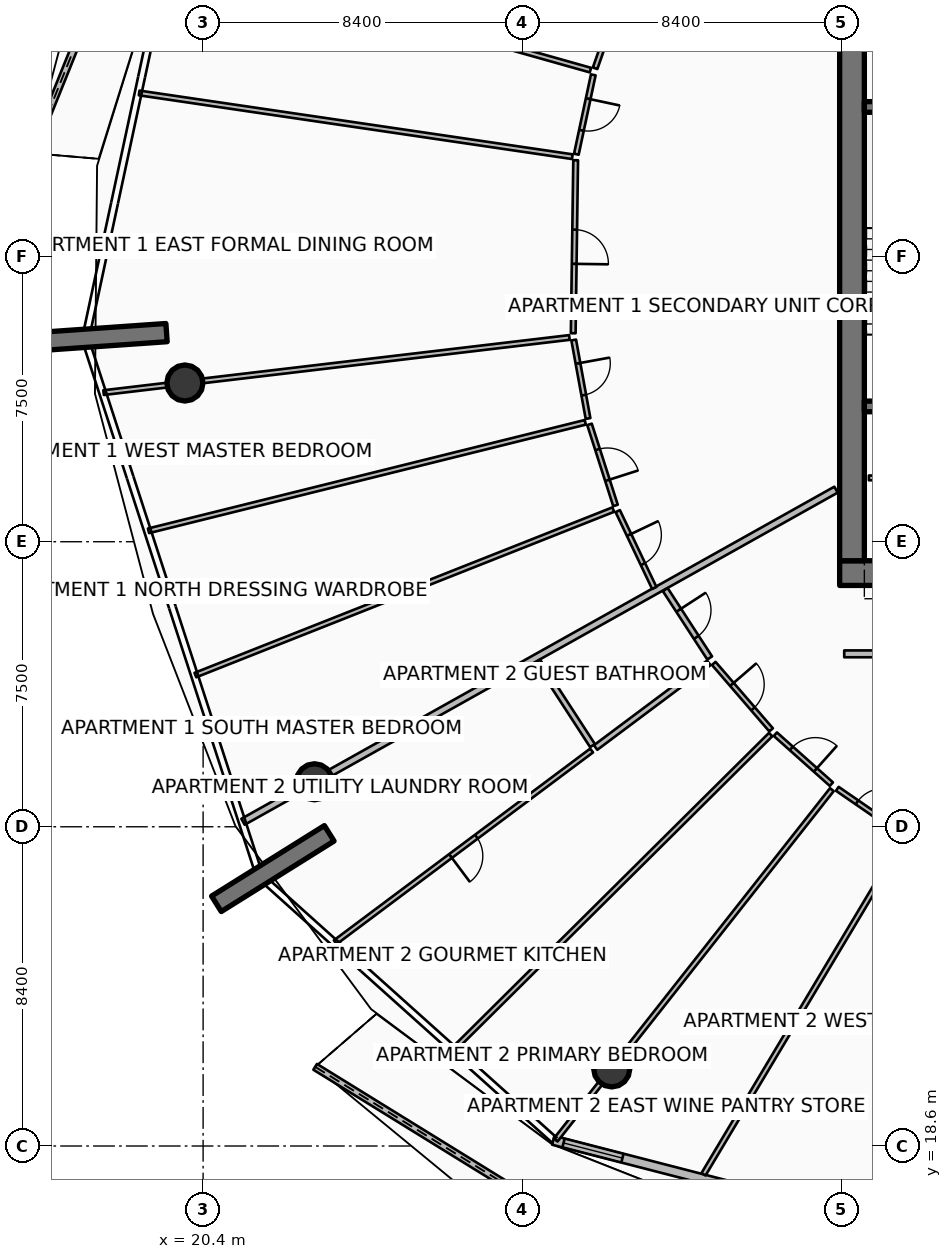
"""IFC4 building model, lengths in metres.
Left out: names, types, materials, properties, quantities, classifications, styles, units other than length and angle.
Written with IfcOpenShell. Run it as: python <this file> out.ifc"""

import sys

from ifc_helpers import new_model, si_unit, direction, frame, frame_2d, origin, origin_2d, place, context, subcontext, project, spatial, polyline, rectangle, circle, outline, extrude, element, fill, save


model = new_model("IFC4")
c1 = context("Model", 3, precision=1e-05, world=origin(), true_north=direction((0.0, 1.0)))
c2 = subcontext(c1, "Body", "Model", "MODEL_VIEW")
j1 = project(units=[si_unit("LENGTHUNIT", "METRE"), si_unit("PLANEANGLEUNIT", "RADIAN")], contexts=[c1])
p1 = place(None, origin())
s1 = spatial("IfcSite", under=j1, at=p1, CompositionType="ELEMENT")
p2 = place(p1, origin())
s2 = spatial("IfcBuilding", under=s1, at=p2, CompositionType="ELEMENT")
p3 = place(p2, frame((0.0, 0.0, 240.55)))
s3 = spatial("IfcBuildingStorey", under=s2, at=p3, CompositionType="ELEMENT", Elevation=240.55)
p4 = place(p3, frame((37.15, 33.675, 0.0), z_axis=(0.0, 0.0, 1.0), x_axis=(1.0, 0.0, 0.0)))
e1 = element("IfcWall", 1, at=p4, inside=s3, PredefinedType="SHEAR", context=c2, shape_type="SweptSolid", body=[
    extrude(rectangle(XDim=9.75, YDim=0.65, at=frame_2d((4.875, 0.0))), origin(), (0.0, 0.0, 1.0), 3.85),
])
p5 = place(p3, frame((37.475, 34.0, 0.0), z_axis=(0.0, 0.0, 1.0), x_axis=(0.0, 1.0, 0.0)))
e2 = element("IfcWall", 2, at=p5, inside=s3, PredefinedType="SHEAR", context=c2, shape_type="SweptSolid", body=[
    extrude(rectangle(XDim=16.0, YDim=0.65, at=frame_2d((8.0, 0.0))), origin(), (0.0, 0.0, 1.0), 3.85),
])
for number, where, z_axis, x_axis in (
    (3, (37.8, 38.06, 0.0), (0.0, 0.0, 1.0), (1.0, 0.0, 0.0)),
    (4, (37.8, 45.94, 0.0), (0.0, 0.0, 1.0), (1.0, 0.0, 0.0)),
):
    element("IfcWall", number, at=place(p3, frame(where, z_axis=z_axis, x_axis=x_axis)), inside=s3, PredefinedType="SHEAR", context=c2, shape_type="SweptSolid", body=[
        extrude(rectangle(XDim=3.5, YDim=0.28, at=frame_2d((1.75, 0.0))), origin(), (0.0, 0.0, 1.0), 3.85),
    ])
p6 = place(p3, frame((19.438, 40.003, 0.0), z_axis=(0.0, 0.0, 1.0), x_axis=(-0.997563824095, -0.069759707979, 0.0)))
e5 = element("IfcWall", 5, at=p6, inside=s3, PredefinedType="SOLIDWALL", context=c2, shape_type="SweptSolid", body=[
    extrude(rectangle(XDim=3.5, YDim=0.48, at=frame_2d((1.75, 0.0))), origin(), (0.0, 0.0, 1.0), 3.85),
])
p7 = place(p3, frame((23.719, 26.827, 0.0), z_axis=(0.0, 0.0, 1.0), x_axis=(-0.848033572426, -0.529942506352, 0.0)))
e6 = element("IfcWall", 6, at=p7, inside=s3, PredefinedType="SOLIDWALL", context=c2, shape_type="SweptSolid", body=[
    extrude(rectangle(XDim=3.5, YDim=0.48, at=frame_2d((1.75, 0.0))), origin(), (0.0, 0.0, 1.0), 3.85),
])
for number, where, z_axis, x_axis in (
    (7, (19.92, 38.677, 0.0), (0.0, 0.0, 1.0), (1.0, 0.0, 0.0)),
    (8, (23.33, 28.184, 0.0), (0.0, 0.0, 1.0), (1.0, 0.0, 0.0)),
    (9, (31.153, 20.629, 0.0), (0.0, 0.0, 1.0), (1.0, 0.0, 0.0)),
):
    element("IfcColumn", number, at=place(p3, frame(where, z_axis=z_axis, x_axis=x_axis)), inside=s3, PredefinedType="COLUMN", context=c2, shape_type="SweptSolid", body=[
        extrude(circle(Radius=0.475, at=origin_2d()), origin(), (0.0, 0.0, 1.0), 3.59),
    ])
p8 = place(p3, frame((20.413, 55.922, 0.0), z_axis=(0.0, 0.0, 1.0), x_axis=(-0.374094279698, -0.927390678138, 0.0)))
e10 = element("IfcWall", 10, at=p8, inside=s3, PredefinedType="PARAPET", context=c2, shape_type="SweptSolid", body=[
    extrude(outline(polyline([(0.0, 0.0), (12.075, 0.0), (12.075, 1.233), (6.037, 1.418), (0.0, 1.632), (0.0, 0.0)])), frame((0.0, 0.09, 0.0), z_axis=(0.0, -1.0, 0.0), x_axis=(1.0, 0.0, 0.0)), (0.0, 0.0, 1.0), 0.18),
])
p9 = place(p3, frame((23.348, 20.684, 0.0), z_axis=(0.0, 0.0, 1.0), x_axis=(0.850900796978, -0.52532640682, 0.0)))
e11 = element("IfcWall", 11, at=p9, inside=s3, PredefinedType="PARAPET", context=c2, shape_type="SweptSolid", body=[
    extrude(outline(polyline([(0.0, 0.0), (12.209, 0.0), (12.208, 1.832), (6.104, 1.696), (0.0, 1.497), (0.0, 0.0)])), frame((0.0, 0.09, 0.0), z_axis=(0.0, -1.0, 0.0), x_axis=(1.0, 0.0, 0.0)), (0.0, 0.0, 1.0), 0.18),
])
p10 = place(p3, frame((29.614, 18.751, 0.0), z_axis=(0.0, 0.0, 1.0), x_axis=(0.968343758421, -0.249620442927, 0.0)))
e12 = element("IfcWall", 12, at=p10, inside=s3, PredefinedType="SOLIDWALL", context=c2, shape_type="SweptSolid", body=[
    extrude(rectangle(XDim=11.438, YDim=0.24, at=frame_2d((5.719, 0.0))), origin(), (0.0, 0.0, 1.0), 2.54),
])
p11 = place(p10, frame((9.218, 0.0, 0.0)))
e13 = element("IfcOpeningElement", 13, at=p11, cuts=e12, PredefinedType="OPENING", context=c2, shape_type="SweptSolid", body=[
    extrude(rectangle(XDim=1.45, YDim=2.15, at=frame_2d((0.725, 1.075))), frame((0.0, 0.13, 0.0), z_axis=(0.0, -1.0, 0.0), x_axis=(1.0, 0.0, 0.0)), (0.0, 0.0, 1.0), 0.26),
])
p12 = place(p10, frame((0.28, 0.0, 0.65)))
e14 = element("IfcOpeningElement", 14, at=p12, cuts=e12, PredefinedType="OPENING", context=c2, shape_type="SweptSolid", body=[
    extrude(rectangle(XDim=1.6, YDim=1.5, at=frame_2d((0.8, 0.75))), frame((0.0, 0.13, 0.0), z_axis=(0.0, -1.0, 0.0), x_axis=(1.0, 0.0, 0.0)), (0.0, 0.0, 1.0), 0.26),
])
p13 = place(p3, frame((37.92, 36.18, 0.0), z_axis=(0.0, 0.0, 1.0), x_axis=(1.0, 0.0, 0.0)))
e15 = element("IfcWall", 15, at=p13, inside=s3, PredefinedType="PARTITIONING", context=c2, shape_type="SweptSolid", body=[
    extrude(rectangle(XDim=8.8, YDim=0.125, at=frame_2d((4.4, 0.0))), origin(), (0.0, 0.0, 1.0), 3.03),
])
p14 = place(p13, frame((3.975, 0.0, 0.0)))
e16 = element("IfcOpeningElement", 16, at=p14, cuts=e15, PredefinedType="OPENING", context=c2, shape_type="SweptSolid", body=[
    extrude(rectangle(XDim=0.85, YDim=2.06, at=frame_2d((0.425, 1.03))), frame((0.0, 0.073, 0.0), z_axis=(0.0, -1.0, 0.0), x_axis=(1.0, 0.0, 0.0)), (0.0, 0.0, 1.0), 0.145),
])
p15 = place(p3, frame((37.054, 35.87, 0.0), z_axis=(0.0, 0.0, 1.0), x_axis=(-0.872490186067, -0.488631635506, 0.0)))
e17 = element("IfcWall", 17, at=p15, inside=s3, PredefinedType="PARTITIONING", context=c2, shape_type="SweptSolid", body=[
    extrude(rectangle(XDim=17.884, YDim=0.18, at=frame_2d((8.942, 0.0))), origin(), (0.0, 0.0, 1.0), 2.957),
])
p16 = place(p3, frame((31.41, 48.938, 0.0), z_axis=(0.0, 0.0, 1.0), x_axis=(-0.331438416753, -0.943476854989, 0.0)))
e18 = element("IfcWall", 18, at=p16, inside=s3, PredefinedType="PARTITIONING", context=c2, shape_type="SweptSolid", body=[
    extrude(rectangle(XDim=2.099, YDim=0.125, at=frame_2d((1.049, 0.0))), origin(), (0.0, 0.0, 1.0), 2.957),
])
p17 = place(p16, frame((0.625, 0.0, 0.0)))
e19 = element("IfcOpeningElement", 19, at=p17, cuts=e18, PredefinedType="OPENING", context=c2, shape_type="SweptSolid", body=[
    extrude(rectangle(XDim=0.85, YDim=2.06, at=frame_2d((0.425, 1.03))), frame((0.0, 0.073, 0.0), z_axis=(0.0, -1.0, 0.0), x_axis=(1.0, 0.0, 0.0)), (0.0, 0.0, 1.0), 0.145),
])
p18 = place(p3, frame((30.592, 46.909, 0.0), z_axis=(0.0, 0.0, 1.0), x_axis=(-0.96245110957, 0.271455082266, 0.0)))
e20 = element("IfcWall", 20, at=p18, inside=s3, PredefinedType="PARTITIONING", context=c2, shape_type="SweptSolid", body=[
    extrude(rectangle(XDim=11.409, YDim=0.125, at=frame_2d((5.704, 0.0))), origin(), (0.0, 0.0, 1.0), 2.957),
])
p19 = place(p3, frame((30.115, 44.631, 0.0), z_axis=(0.0, 0.0, 1.0), x_axis=(-0.989347020715, 0.145576346298, 0.0)))
e21 = element("IfcWall", 21, at=p19, inside=s3, PredefinedType="PARTITIONING", context=c2, shape_type="SweptSolid", body=[
    extrude(rectangle(XDim=11.521, YDim=0.125, at=frame_2d((5.761, 0.0))), origin(), (0.0, 0.0, 1.0), 3.03),
])
p20 = place(p3, frame((30.667, 46.785, 0.0), z_axis=(0.0, 0.0, 1.0), x_axis=(-0.209005902588, -0.977914379014, 0.0)))
e22 = element("IfcWall", 22, at=p20, inside=s3, PredefinedType="PARTITIONING", context=c2, shape_type="SweptSolid", body=[
    extrude(rectangle(XDim=2.135, YDim=0.125, at=frame_2d((1.068, 0.0))), origin(), (0.0, 0.0, 1.0), 2.957),
])
p21 = place(p20, frame((0.643, 0.0, 0.0)))
e23 = element("IfcOpeningElement", 23, at=p21, cuts=e22, PredefinedType="OPENING", context=c2, shape_type="SweptSolid", body=[
    extrude(rectangle(XDim=0.85, YDim=2.06, at=frame_2d((0.425, 1.03))), frame((0.0, 0.073, 0.0), z_axis=(0.0, -1.0, 0.0), x_axis=(1.0, 0.0, 0.0)), (0.0, 0.0, 1.0), 0.145),
])
p22 = place(p3, frame((30.204, 44.538, 0.0), z_axis=(0.0, 0.0, 1.0), x_axis=(-0.014156354672, -0.999899793791, 0.0)))
e24 = element("IfcWall", 24, at=p22, inside=s3, PredefinedType="PARTITIONING", context=c2, shape_type="SweptSolid", body=[
    extrude(rectangle(XDim=4.553, YDim=0.125, at=frame_2d((2.276, 0.0))), origin(), (0.0, 0.0, 1.0), 2.957),
])
p23 = place(p22, frame((1.826, 0.0, 0.0)))
e25 = element("IfcOpeningElement", 25, at=p23, cuts=e24, PredefinedType="OPENING", context=c2, shape_type="SweptSolid", body=[
    extrude(rectangle(XDim=0.9, YDim=2.08, at=frame_2d((0.45, 1.04))), frame((0.0, 0.073, 0.0), z_axis=(0.0, -1.0, 0.0), x_axis=(1.0, 0.0, 0.0)), (0.0, 0.0, 1.0), 0.145),
])
p24 = place(p3, frame((30.038, 39.874, 0.0), z_axis=(0.0, 0.0, 1.0), x_axis=(-0.993068810962, -0.117534406428, 0.0)))
e26 = element("IfcWall", 26, at=p24, inside=s3, PredefinedType="PARTITIONING", context=c2, shape_type="SweptSolid", body=[
    extrude(rectangle(XDim=12.343, YDim=0.125, at=frame_2d((6.171, 0.0))), origin(), (0.0, 0.0, 1.0), 2.957),
])
p25 = place(p3, frame((30.456, 37.642, 0.0), z_axis=(0.0, 0.0, 1.0), x_axis=(-0.970505215381, -0.241080125513, 0.0)))
e27 = element("IfcWall", 27, at=p25, inside=s3, PredefinedType="PARTITIONING", context=c2, shape_type="SweptSolid", body=[
    extrude(rectangle(XDim=11.843, YDim=0.125, at=frame_2d((5.921, 0.0))), origin(), (0.0, 0.0, 1.0), 3.03),
])
p26 = place(p3, frame((31.192, 35.345, 0.0), z_axis=(0.0, 0.0, 1.0), x_axis=(-0.929773642051, -0.368131735317, 0.0)))
e28 = element("IfcWall", 28, at=p26, inside=s3, PredefinedType="PARTITIONING", context=c2, shape_type="SweptSolid", body=[
    extrude(rectangle(XDim=11.827, YDim=0.125, at=frame_2d((5.913, 0.0))), origin(), (0.0, 0.0, 1.0), 3.03),
])
p27 = place(p3, frame((30.152, 39.807, 0.0), z_axis=(0.0, 0.0, 1.0), x_axis=(0.179601937348, -0.983739367973, 0.0)))
e29 = element("IfcWall", 29, at=p27, inside=s3, PredefinedType="PARTITIONING", context=c2, shape_type="SweptSolid", body=[
    extrude(rectangle(XDim=2.099, YDim=0.125, at=frame_2d((1.049, 0.0))), origin(), (0.0, 0.0, 1.0), 2.957),
])
p28 = place(p27, frame((0.625, 0.0, 0.0)))
e30 = element("IfcOpeningElement", 30, at=p28, cuts=e29, PredefinedType="OPENING", context=c2, shape_type="SweptSolid", body=[
    extrude(rectangle(XDim=0.85, YDim=2.06, at=frame_2d((0.425, 1.03))), frame((0.0, 0.073, 0.0), z_axis=(0.0, -1.0, 0.0), x_axis=(1.0, 0.0, 0.0)), (0.0, 0.0, 1.0), 0.145),
])
p29 = place(p3, frame((30.568, 37.588, 0.0), z_axis=(0.0, 0.0, 1.0), x_axis=(0.305285840617, -0.952260760254, 0.0)))
e31 = element("IfcWall", 31, at=p29, inside=s3, PredefinedType="PARTITIONING", context=c2, shape_type="SweptSolid", body=[
    extrude(rectangle(XDim=2.24, YDim=0.125, at=frame_2d((1.12, 0.0))), origin(), (0.0, 0.0, 1.0), 3.03),
])
p30 = place(p29, frame((0.695, 0.0, 0.0)))
e32 = element("IfcOpeningElement", 32, at=p30, cuts=e31, PredefinedType="OPENING", context=c2, shape_type="SweptSolid", body=[
    extrude(rectangle(XDim=0.85, YDim=2.06, at=frame_2d((0.425, 1.03))), frame((0.0, 0.073, 0.0), z_axis=(0.0, -1.0, 0.0), x_axis=(1.0, 0.0, 0.0)), (0.0, 0.0, 1.0), 0.145),
])
p31 = place(p3, frame((31.31, 35.306, 0.0), z_axis=(0.0, 0.0, 1.0), x_axis=(0.429468098594, -0.903082029657, 0.0)))
e33 = element("IfcWall", 33, at=p31, inside=s3, PredefinedType="PARTITIONING", context=c2, shape_type="SweptSolid", body=[
    extrude(rectangle(XDim=2.24, YDim=0.125, at=frame_2d((1.12, 0.0))), origin(), (0.0, 0.0, 1.0), 2.957),
])
p32 = place(p31, frame((0.695, 0.0, 0.0)))
e34 = element("IfcOpeningElement", 34, at=p32, cuts=e33, PredefinedType="OPENING", context=c2, shape_type="SweptSolid", body=[
    extrude(rectangle(XDim=0.85, YDim=2.06, at=frame_2d((0.425, 1.03))), frame((0.0, 0.073, 0.0), z_axis=(0.0, -1.0, 0.0), x_axis=(1.0, 0.0, 0.0)), (0.0, 0.0, 1.0), 0.145),
])
p33 = place(p3, frame((37.27, 31.55, 0.0), z_axis=(0.0, 0.0, 1.0), x_axis=(1.0, 0.0, 0.0)))
e35 = element("IfcWall", 35, at=p33, inside=s3, PredefinedType="PARTITIONING", context=c2, shape_type="SweptSolid", body=[
    extrude(rectangle(XDim=2.372, YDim=0.18, at=frame_2d((1.186, 0.0))), origin(), (0.0, 0.0, 1.0), 2.957),
])
p34 = place(p3, frame((32.562, 33.24, 0.0), z_axis=(0.0, 0.0, 1.0), x_axis=(0.544888302375, -0.838508639154, 0.0)))
e36 = element("IfcWall", 36, at=p34, inside=s3, PredefinedType="PARTITIONING", context=c2, shape_type="SweptSolid", body=[
    extrude(rectangle(XDim=2.144, YDim=0.15, at=frame_2d((1.072, 0.0))), origin(), (0.0, 0.0, 1.0), 2.957),
])
p35 = place(p34, frame((0.647, 0.0, 0.0)))
e37 = element("IfcOpeningElement", 37, at=p35, cuts=e36, PredefinedType="OPENING", context=c2, shape_type="SweptSolid", body=[
    extrude(rectangle(XDim=0.85, YDim=2.06, at=frame_2d((0.425, 1.03))), frame((0.0, 0.085, 0.0), z_axis=(0.0, -1.0, 0.0), x_axis=(1.0, 0.0, 0.0)), (0.0, 0.0, 1.0), 0.17),
])
p36 = place(p3, frame((29.202, 31.359, 0.0), z_axis=(0.0, 0.0, 1.0), x_axis=(0.544926834082, -0.838483598825, 0.0)))
e38 = element("IfcWall", 38, at=p36, inside=s3, PredefinedType="PARTITIONING", context=c2, shape_type="SweptSolid", body=[
    extrude(rectangle(XDim=2.651, YDim=0.15, at=frame_2d((1.325, 0.0))), origin(), (0.0, 0.0, 1.0), 2.957),
])
p37 = place(p3, frame((33.707, 31.312, 0.0), z_axis=(0.0, 0.0, 1.0), x_axis=(-0.800889069655, -0.598812740435, 0.0)))
e39 = element("IfcWall", 39, at=p37, inside=s3, PredefinedType="PARTITIONING", context=c2, shape_type="SweptSolid", body=[
    extrude(rectangle(XDim=3.72, YDim=0.15, at=frame_2d((1.86, 0.0))), origin(), (0.0, 0.0, 1.0), 3.03),
])
p38 = place(p3, frame((30.624, 29.007, 0.0), z_axis=(0.0, 0.0, 1.0), x_axis=(-0.800861586428, -0.598849496437, 0.0)))
e40 = element("IfcWall", 40, at=p38, inside=s3, PredefinedType="PARTITIONING", context=c2, shape_type="SweptSolid", body=[
    extrude(rectangle(XDim=8.425, YDim=0.125, at=frame_2d((4.212, 0.0))), origin(), (0.0, 0.0, 1.0), 3.03),
])
p39 = place(p38, frame((3.787, 0.0, 0.0)))
e41 = element("IfcOpeningElement", 41, at=p39, cuts=e40, PredefinedType="OPENING", context=c2, shape_type="SweptSolid", body=[
    extrude(rectangle(XDim=0.85, YDim=2.06, at=frame_2d((0.425, 1.03))), frame((0.0, 0.073, 0.0), z_axis=(0.0, -1.0, 0.0), x_axis=(1.0, 0.0, 0.0)), (0.0, 0.0, 1.0), 0.145),
])
p40 = place(p3, frame((35.335, 29.426, 0.0), z_axis=(0.0, 0.0, 1.0), x_axis=(-0.709660425086, -0.704543881576, 0.0)))
e42 = element("IfcWall", 42, at=p40, inside=s3, PredefinedType="PARTITIONING", context=c2, shape_type="SweptSolid", body=[
    extrude(rectangle(XDim=11.738, YDim=0.125, at=frame_2d((5.869, 0.0))), origin(), (0.0, 0.0, 1.0), 3.03),
])
p41 = place(p3, frame((33.838, 31.298, 0.0), z_axis=(0.0, 0.0, 1.0), x_axis=(0.653278423857, -0.757117758954, 0.0)))
e43 = element("IfcWall", 43, at=p41, inside=s3, PredefinedType="PARTITIONING", context=c2, shape_type="SweptSolid", body=[
    extrude(rectangle(XDim=2.309, YDim=0.125, at=frame_2d((1.154, 0.0))), origin(), (0.0, 0.0, 1.0), 3.03),
])
p42 = place(p41, frame((0.729, 0.0, 0.0)))
e44 = element("IfcOpeningElement", 44, at=p42, cuts=e43, PredefinedType="OPENING", context=c2, shape_type="SweptSolid", body=[
    extrude(rectangle(XDim=0.85, YDim=2.06, at=frame_2d((0.425, 1.03))), frame((0.0, 0.073, 0.0), z_axis=(0.0, -1.0, 0.0), x_axis=(1.0, 0.0, 0.0)), (0.0, 0.0, 1.0), 0.145),
])
p43 = place(p3, frame((35.458, 29.436, 0.0), z_axis=(0.0, 0.0, 1.0), x_axis=(0.746255603185, -0.665659503586, 0.0)))
e45 = element("IfcWall", 45, at=p43, inside=s3, PredefinedType="PARTITIONING", context=c2, shape_type="SweptSolid", body=[
    extrude(rectangle(XDim=1.975, YDim=0.125, at=frame_2d((0.988, 0.0))), origin(), (0.0, 0.0, 1.0), 2.957),
])
p44 = place(p43, frame((0.562, 0.0, 0.0)))
e46 = element("IfcOpeningElement", 46, at=p44, cuts=e45, PredefinedType="OPENING", context=c2, shape_type="SweptSolid", body=[
    extrude(rectangle(XDim=0.85, YDim=2.06, at=frame_2d((0.425, 1.03))), frame((0.0, 0.073, 0.0), z_axis=(0.0, -1.0, 0.0), x_axis=(1.0, 0.0, 0.0)), (0.0, 0.0, 1.0), 0.145),
])
p45 = place(p3, frame((36.945, 27.977, 0.0), z_axis=(0.0, 0.0, 1.0), x_axis=(-0.619096573209, -0.785314862358, 0.0)))
e47 = element("IfcWall", 47, at=p45, inside=s3, PredefinedType="PARTITIONING", context=c2, shape_type="SweptSolid", body=[
    extrude(rectangle(XDim=11.739, YDim=0.125, at=frame_2d((5.869, 0.0))), origin(), (0.0, 0.0, 1.0), 2.957),
])
p46 = place(p3, frame((38.843, 26.681, 0.0), z_axis=(0.0, 0.0, 1.0), x_axis=(-0.513080899873, -0.858340253154, 0.0)))
e48 = element("IfcWall", 48, at=p46, inside=s3, PredefinedType="PARTITIONING", context=c2, shape_type="SweptSolid", body=[
    extrude(rectangle(XDim=10.282, YDim=0.125, at=frame_2d((5.141, 0.0))), origin(), (0.0, 0.0, 1.0), 3.03),
])
p47 = place(p3, frame((37.089, 27.998, 0.0), z_axis=(0.0, 0.0, 1.0), x_axis=(0.823534084839, -0.567266790063, 0.0)))
e49 = element("IfcWall", 49, at=p47, inside=s3, PredefinedType="PARTITIONING", context=c2, shape_type="SweptSolid", body=[
    extrude(rectangle(XDim=2.105, YDim=0.125, at=frame_2d((1.053, 0.0))), origin(), (0.0, 0.0, 1.0), 2.957),
])
p48 = place(p47, frame((0.628, 0.0, 0.0)))
e50 = element("IfcOpeningElement", 50, at=p48, cuts=e49, PredefinedType="OPENING", context=c2, shape_type="SweptSolid", body=[
    extrude(rectangle(XDim=0.85, YDim=2.06, at=frame_2d((0.425, 1.03))), frame((0.0, 0.073, 0.0), z_axis=(0.0, -1.0, 0.0), x_axis=(1.0, 0.0, 0.0)), (0.0, 0.0, 1.0), 0.145),
])
p49 = place(p12, origin())
e51 = element("IfcWindow", 51, at=p49, inside=s3, PartitioningType="SINGLE_PANEL", PredefinedType="WINDOW", context=c2, shape_type="SweptSolid", body=[
    extrude(rectangle(XDim=1.6, YDim=1.5, at=frame_2d((0.8, 0.75))), frame((0.0, 0.03, 0.0), z_axis=(0.0, -1.0, 0.0), x_axis=(1.0, 0.0, 0.0)), (0.0, 0.0, 1.0), 0.06),
])
fill(e14, e51)
p50 = place(p21, origin())
e52 = element("IfcDoor", 52, at=p50, inside=s3, OperationType="SINGLE_SWING_LEFT", PredefinedType="DOOR", context=c2, shape_type="SweptSolid", body=[
    extrude(rectangle(XDim=0.85, YDim=2.06, at=frame_2d((0.425, 1.03))), frame((0.0, 0.025, 0.0), z_axis=(0.0, -1.0, 0.0), x_axis=(1.0, 0.0, 0.0)), (0.0, 0.0, 1.0), 0.05),
])
fill(e23, e52)
p51 = place(p23, origin())
e53 = element("IfcDoor", 53, at=p51, inside=s3, OperationType="SINGLE_SWING_RIGHT", PredefinedType="DOOR", context=c2, shape_type="SweptSolid", body=[
    extrude(rectangle(XDim=0.9, YDim=2.08, at=frame_2d((0.45, 1.04))), frame((0.0, 0.025, 0.0), z_axis=(0.0, -1.0, 0.0), x_axis=(1.0, 0.0, 0.0)), (0.0, 0.0, 1.0), 0.05),
])
fill(e25, e53)
p52 = place(p28, origin())
e54 = element("IfcDoor", 54, at=p52, inside=s3, OperationType="SINGLE_SWING_LEFT", PredefinedType="DOOR", context=c2, shape_type="SweptSolid", body=[
    extrude(rectangle(XDim=0.85, YDim=2.06, at=frame_2d((0.425, 1.03))), frame((0.0, 0.025, 0.0), z_axis=(0.0, -1.0, 0.0), x_axis=(1.0, 0.0, 0.0)), (0.0, 0.0, 1.0), 0.05),
])
fill(e30, e54)
p53 = place(p30, origin())
e55 = element("IfcDoor", 55, at=p53, inside=s3, OperationType="SINGLE_SWING_RIGHT", PredefinedType="DOOR", context=c2, shape_type="SweptSolid", body=[
    extrude(rectangle(XDim=0.85, YDim=2.06, at=frame_2d((0.425, 1.03))), frame((0.0, 0.025, 0.0), z_axis=(0.0, -1.0, 0.0), x_axis=(1.0, 0.0, 0.0)), (0.0, 0.0, 1.0), 0.05),
])
fill(e32, e55)
p54 = place(p32, origin())
e56 = element("IfcDoor", 56, at=p54, inside=s3, OperationType="SINGLE_SWING_LEFT", PredefinedType="DOOR", context=c2, shape_type="SweptSolid", body=[
    extrude(rectangle(XDim=0.85, YDim=2.06, at=frame_2d((0.425, 1.03))), frame((0.0, 0.025, 0.0), z_axis=(0.0, -1.0, 0.0), x_axis=(1.0, 0.0, 0.0)), (0.0, 0.0, 1.0), 0.05),
])
fill(e34, e56)
p55 = place(p35, origin())
e57 = element("IfcDoor", 57, at=p55, inside=s3, OperationType="SINGLE_SWING_LEFT", PredefinedType="DOOR", context=c2, shape_type="SweptSolid", body=[
    extrude(rectangle(XDim=0.85, YDim=2.06, at=frame_2d((0.425, 1.03))), frame((0.0, 0.025, 0.0), z_axis=(0.0, -1.0, 0.0), x_axis=(1.0, 0.0, 0.0)), (0.0, 0.0, 1.0), 0.05),
])
fill(e37, e57)
p56 = place(p39, origin())
e58 = element("IfcDoor", 58, at=p56, inside=s3, OperationType="SINGLE_SWING_RIGHT", PredefinedType="DOOR", context=c2, shape_type="SweptSolid", body=[
    extrude(rectangle(XDim=0.85, YDim=2.06, at=frame_2d((0.425, 1.03))), frame((0.0, 0.025, 0.0), z_axis=(0.0, -1.0, 0.0), x_axis=(1.0, 0.0, 0.0)), (0.0, 0.0, 1.0), 0.05),
])
fill(e41, e58)
p57 = place(p42, origin())
e59 = element("IfcDoor", 59, at=p57, inside=s3, OperationType="SINGLE_SWING_LEFT", PredefinedType="DOOR", context=c2, shape_type="SweptSolid", body=[
    extrude(rectangle(XDim=0.85, YDim=2.06, at=frame_2d((0.425, 1.03))), frame((0.0, 0.025, 0.0), z_axis=(0.0, -1.0, 0.0), x_axis=(1.0, 0.0, 0.0)), (0.0, 0.0, 1.0), 0.05),
])
fill(e44, e59)
p58 = place(p44, origin())
e60 = element("IfcDoor", 60, at=p58, inside=s3, OperationType="SINGLE_SWING_RIGHT", PredefinedType="DOOR", context=c2, shape_type="SweptSolid", body=[
    extrude(rectangle(XDim=0.85, YDim=2.06, at=frame_2d((0.425, 1.03))), frame((0.0, 0.025, 0.0), z_axis=(0.0, -1.0, 0.0), x_axis=(1.0, 0.0, 0.0)), (0.0, 0.0, 1.0), 0.05),
])
fill(e46, e60)
p59 = place(p48, origin())
e61 = element("IfcDoor", 61, at=p59, inside=s3, OperationType="SINGLE_SWING_RIGHT", PredefinedType="DOOR", context=c2, shape_type="SweptSolid", body=[
    extrude(rectangle(XDim=0.85, YDim=2.06, at=frame_2d((0.425, 1.03))), frame((0.0, 0.025, 0.0), z_axis=(0.0, -1.0, 0.0), x_axis=(1.0, 0.0, 0.0)), (0.0, 0.0, 1.0), 0.05),
])
fill(e50, e61)
save(model, sys.argv[1])
